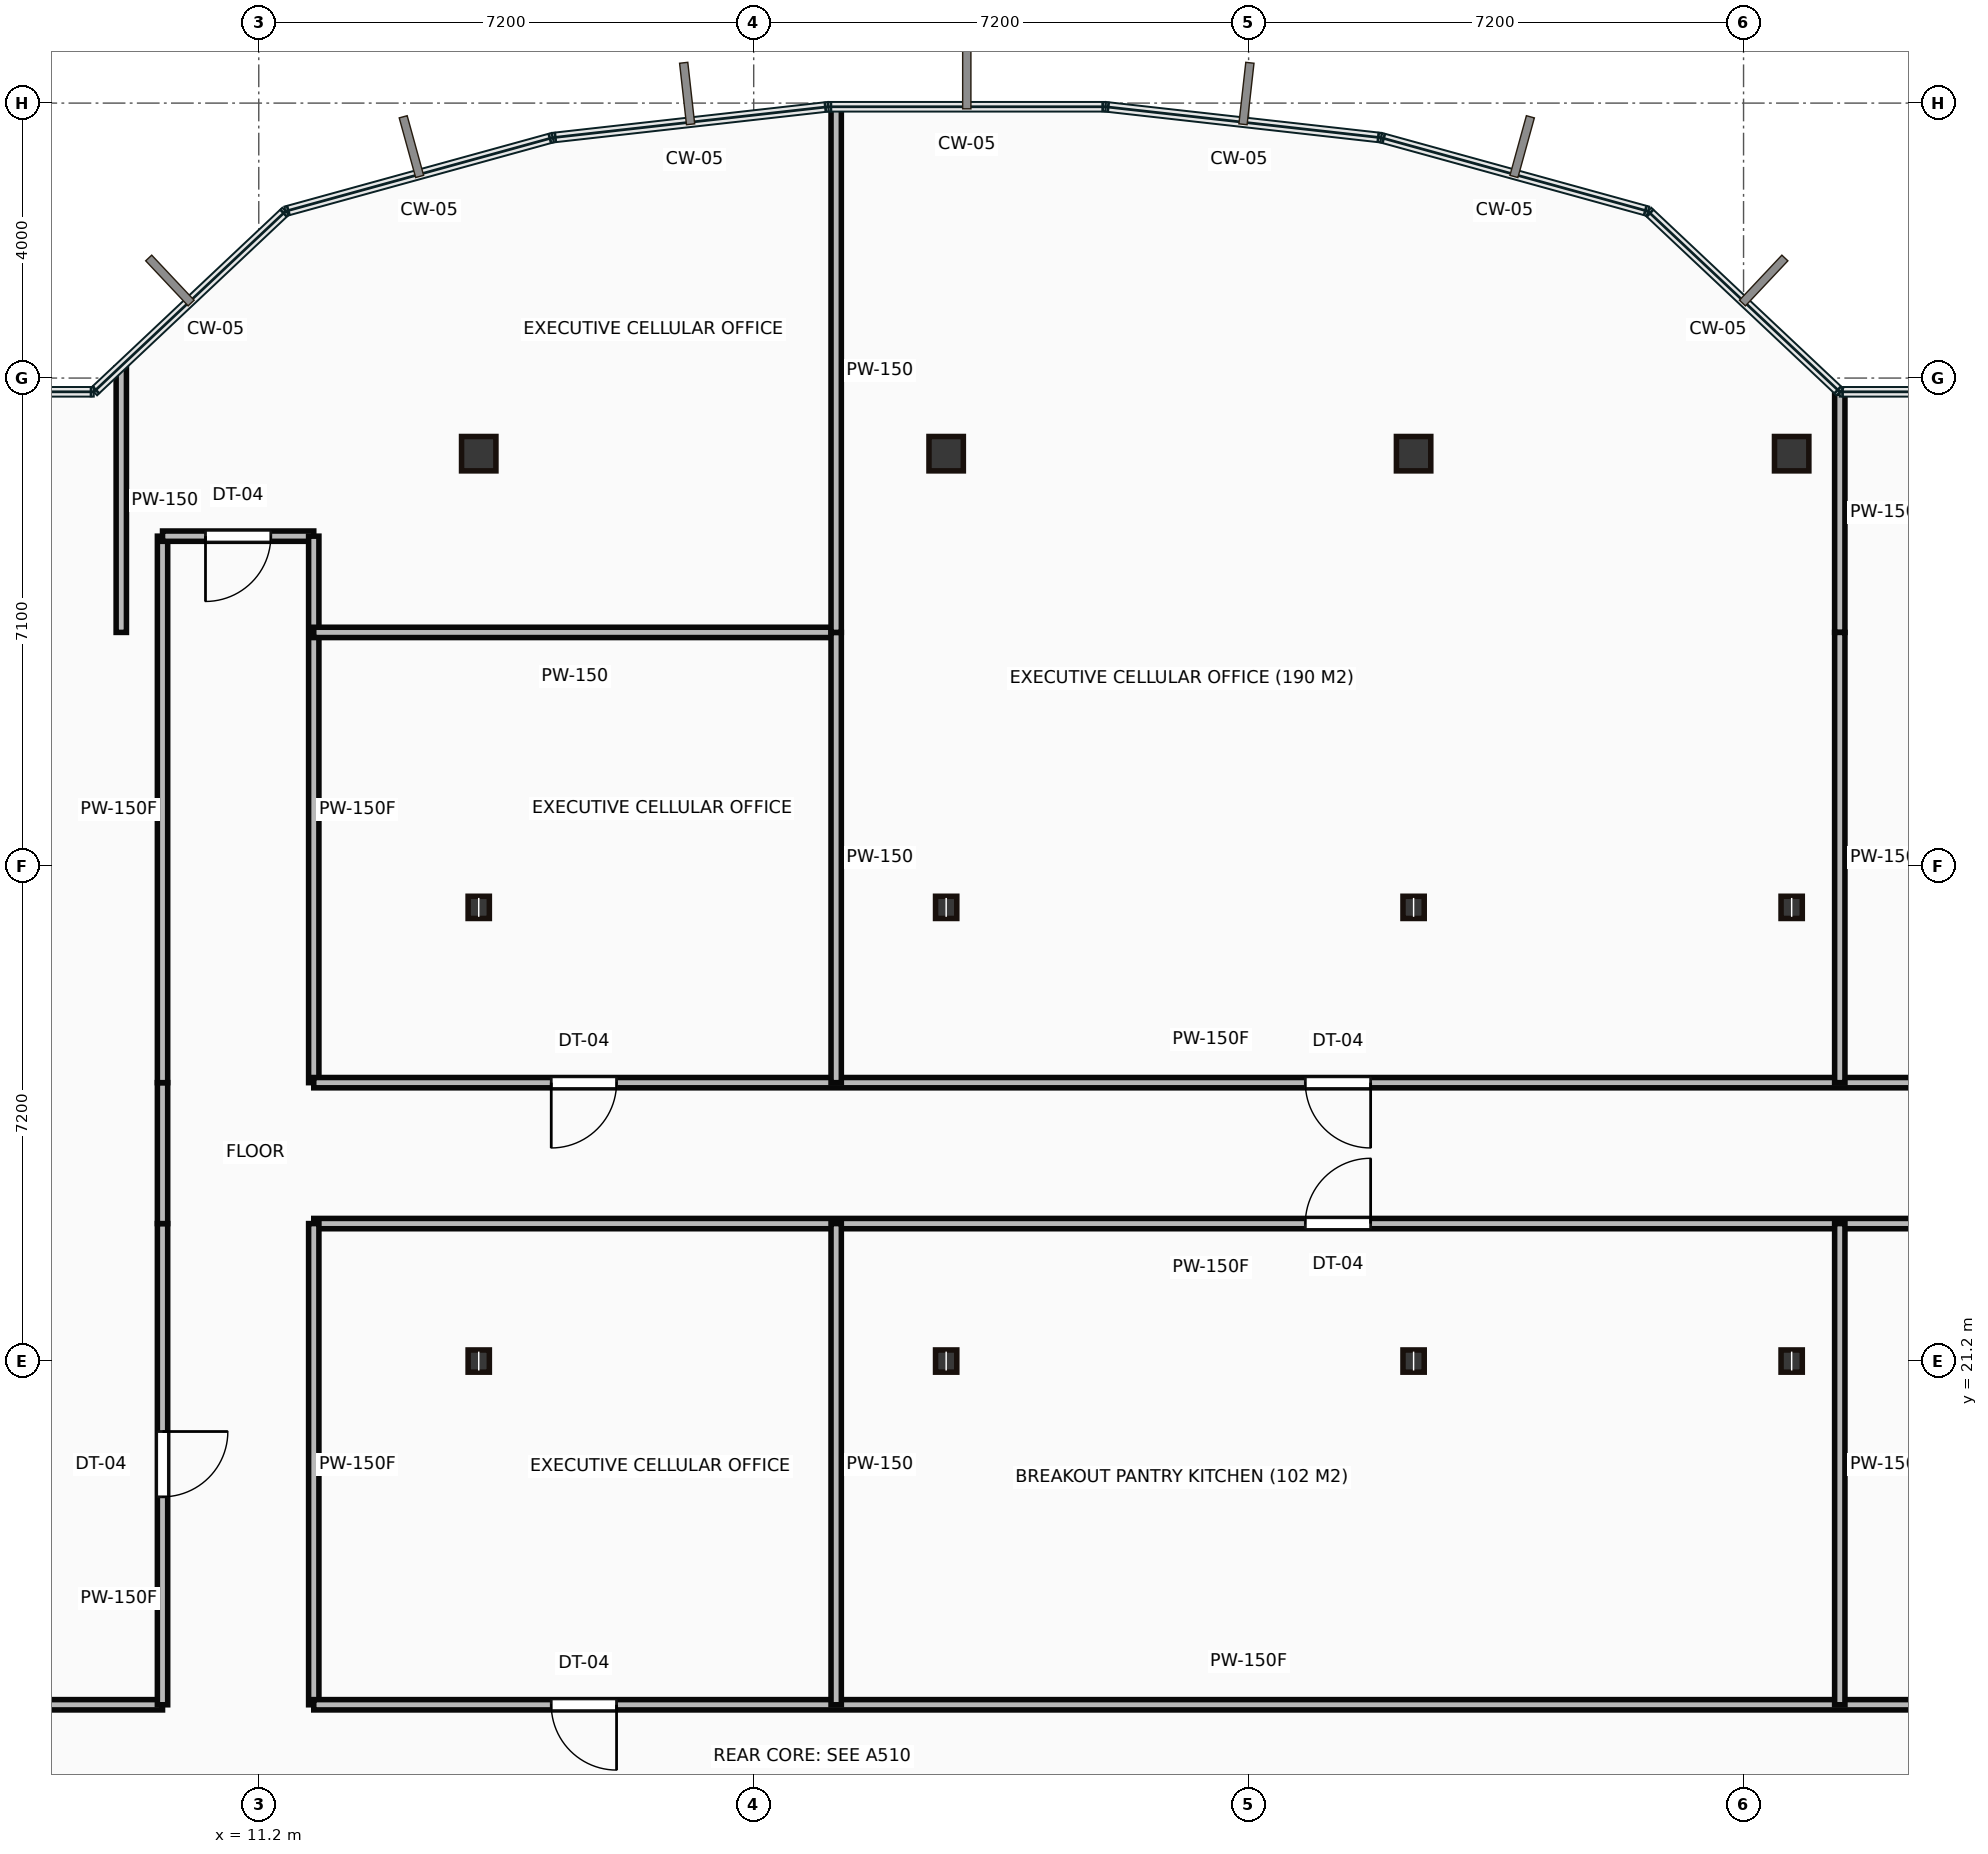
"""IFC4 building model, lengths in metres.
Left out: names, types, materials, properties, quantities, classifications, styles, units other than length and angle.
Written with IfcOpenShell. Run it as: python <this file> out.ifc"""

import sys

from ifc_helpers import new_model, si_unit, direction, frame, frame_2d, origin, origin_2d, place, context, subcontext, project, spatial, rectangle, hollow_rectangle, i_section, extrude, source, transform, mapped, element, fill, save


model = new_model("IFC4")
c1 = context("Model", 3, precision=1e-05, world=origin(), true_north=direction((0.0, 1.0)))
c2 = subcontext(c1, "Body", "Model", "MODEL_VIEW")
j1 = project(units=[si_unit("LENGTHUNIT", "METRE"), si_unit("PLANEANGLEUNIT", "RADIAN")], contexts=[c1])
p1 = place(None, origin())
s1 = spatial("IfcSite", under=j1, at=p1, CompositionType="ELEMENT")
p2 = place(p1, origin())
s2 = spatial("IfcBuilding", under=s1, at=p2, CompositionType="ELEMENT")
p3 = place(p2, frame((0.0, 0.0, 232.4)))
s3 = spatial("IfcBuildingStorey", under=s2, at=p3, CompositionType="ELEMENT", Elevation=232.4)
m1 = source(origin(), c2, "Body", "SweptSolid", [
    extrude(i_section(OverallWidth=0.309, OverallDepth=0.323, WebThickness=0.014, FlangeThickness=0.023, at=origin_2d()), origin(), (0.0, 0.0, 1.0), 3.65),
])
for number, where, z_axis, x_axis in (
    (1, (14.4, 21.2, 0.0), (0.0, 0.0, 1.0), (1.0, 0.0, 0.0)),
    (2, (14.4, 27.8, 0.0), (0.0, 0.0, 1.0), (1.0, 0.0, 0.0)),
):
    element("IfcColumn", number, at=place(p3, frame(where, z_axis=z_axis, x_axis=x_axis)), inside=s3, PredefinedType="COLUMN", context=c2, shape_type="MappedRepresentation", body=[
        mapped(m1, transform((0.0, 0.0, 0.0))),
    ])
m2 = source(origin(), c2, "Body", "SweptSolid", [
    extrude(hollow_rectangle(XDim=0.5, YDim=0.5, WallThickness=0.022, at=origin_2d()), origin(), (0.0, 0.0, 1.0), 3.65),
])
p4 = place(p3, frame((14.4, 34.4, 0.0), z_axis=(0.0, 0.0, 1.0), x_axis=(1.0, 0.0, 0.0)))
e3 = element("IfcColumn", 3, at=p4, inside=s3, PredefinedType="COLUMN", context=c2, shape_type="MappedRepresentation", body=[
    mapped(m2, transform((0.0, 0.0, 0.0))),
])
for number, where, z_axis, x_axis in (
    (4, (21.2, 21.2, 0.0), (0.0, 0.0, 1.0), (1.0, 0.0, 0.0)),
    (5, (21.2, 27.8, 0.0), (0.0, 0.0, 1.0), (1.0, 0.0, 0.0)),
):
    element("IfcColumn", number, at=place(p3, frame(where, z_axis=z_axis, x_axis=x_axis)), inside=s3, PredefinedType="COLUMN", context=c2, shape_type="MappedRepresentation", body=[
        mapped(m1, transform((0.0, 0.0, 0.0))),
    ])
p5 = place(p3, frame((21.2, 34.4, 0.0), z_axis=(0.0, 0.0, 1.0), x_axis=(1.0, 0.0, 0.0)))
e6 = element("IfcColumn", 6, at=p5, inside=s3, PredefinedType="COLUMN", context=c2, shape_type="MappedRepresentation", body=[
    mapped(m2, transform((0.0, 0.0, 0.0))),
])
for number, where, z_axis, x_axis in (
    (7, (28.0, 21.2, 0.0), (0.0, 0.0, 1.0), (1.0, 0.0, 0.0)),
    (8, (28.0, 27.8, 0.0), (0.0, 0.0, 1.0), (1.0, 0.0, 0.0)),
):
    element("IfcColumn", number, at=place(p3, frame(where, z_axis=z_axis, x_axis=x_axis)), inside=s3, PredefinedType="COLUMN", context=c2, shape_type="MappedRepresentation", body=[
        mapped(m1, transform((0.0, 0.0, 0.0))),
    ])
p6 = place(p3, frame((28.0, 34.4, 0.0), z_axis=(0.0, 0.0, 1.0), x_axis=(1.0, 0.0, 0.0)))
e9 = element("IfcColumn", 9, at=p6, inside=s3, PredefinedType="COLUMN", context=c2, shape_type="MappedRepresentation", body=[
    mapped(m2, transform((0.0, 0.0, 0.0))),
])
for number, where, z_axis, x_axis in (
    (10, (33.5, 21.2, 0.0), (0.0, 0.0, 1.0), (1.0, 0.0, 0.0)),
    (11, (33.5, 27.8, 0.0), (0.0, 0.0, 1.0), (1.0, 0.0, 0.0)),
):
    element("IfcColumn", number, at=place(p3, frame(where, z_axis=z_axis, x_axis=x_axis)), inside=s3, PredefinedType="COLUMN", context=c2, shape_type="MappedRepresentation", body=[
        mapped(m1, transform((0.0, 0.0, 0.0))),
    ])
p7 = place(p3, frame((33.5, 34.4, 0.0), z_axis=(0.0, 0.0, 1.0), x_axis=(1.0, 0.0, 0.0)))
e12 = element("IfcColumn", 12, at=p7, inside=s3, PredefinedType="COLUMN", context=c2, shape_type="MappedRepresentation", body=[
    mapped(m2, transform((0.0, 0.0, 0.0))),
])
m3 = source(origin(), c2, "Body", "SweptSolid", [
    extrude(rectangle(XDim=5.2, YDim=0.15, at=frame_2d((2.6, 0.0))), origin(), (0.0, 0.0, 1.0), 3.35),
])
p8 = place(p3, frame((4.6, 16.2, 0.0), z_axis=(0.0, 0.0, 1.0), x_axis=(1.0, 0.0, 0.0)))
e13 = element("IfcWall", 13, at=p8, inside=s3, PredefinedType="PARTITIONING", context=c2, shape_type="MappedRepresentation", body=[
    mapped(m3, transform((0.0, 0.0, 0.0))),
])
m4 = source(origin(), c2, "Body", "SweptSolid", [
    extrude(rectangle(XDim=7.0, YDim=0.15, at=frame_2d((3.5, 0.0))), origin(), (0.0, 0.0, 1.0), 3.35),
])
p9 = place(p3, frame((9.8, 16.2, 0.0), z_axis=(0.0, 0.0, 1.0), x_axis=(0.0, 1.0, 0.0)))
e14 = element("IfcWall", 14, at=p9, inside=s3, PredefinedType="PARTITIONING", context=c2, shape_type="MappedRepresentation", body=[
    mapped(m4, transform((0.0, 0.0, 0.0))),
])
p10 = place(p9, frame((3.025, 0.0, 0.0)))
e15 = element("IfcOpeningElement", 15, at=p10, cuts=e14, PredefinedType="OPENING", context=c2, shape_type="SweptSolid", body=[
    extrude(rectangle(XDim=0.95, YDim=2.15, at=frame_2d((0.475, 1.075))), frame((0.0, 0.085, 0.0), z_axis=(0.0, -1.0, 0.0), x_axis=(1.0, 0.0, 0.0)), (0.0, 0.0, 1.0), 0.17),
])
m5 = source(origin(), c2, "Body", "SweptSolid", [
    extrude(rectangle(XDim=2.05, YDim=0.15, at=frame_2d((1.025, 0.0))), origin(), (0.0, 0.0, 1.0), 3.35),
])
p11 = place(p3, frame((9.8, 23.2, 0.0), z_axis=(0.0, 0.0, 1.0), x_axis=(0.0, 1.0, 0.0)))
e16 = element("IfcWall", 16, at=p11, inside=s3, PredefinedType="PARTITIONING", context=c2, shape_type="MappedRepresentation", body=[
    mapped(m5, transform((0.0, 0.0, 0.0))),
])
m6 = source(origin(), c2, "Body", "SweptSolid", [
    extrude(rectangle(XDim=7.95, YDim=0.15, at=frame_2d((3.975, 0.0))), origin(), (0.0, 0.0, 1.0), 3.35),
])
p12 = place(p3, frame((9.8, 25.25, 0.0), z_axis=(0.0, 0.0, 1.0), x_axis=(0.0, 1.0, 0.0)))
e17 = element("IfcWall", 17, at=p12, inside=s3, PredefinedType="PARTITIONING", context=c2, shape_type="MappedRepresentation", body=[
    mapped(m6, transform((0.0, 0.0, 0.0))),
])
m7 = source(origin(), c2, "Body", "SweptSolid", [
    extrude(rectangle(XDim=2.2, YDim=0.15, at=frame_2d((1.1, 0.0))), origin(), (0.0, 0.0, 1.0), 3.35),
])
p13 = place(p3, frame((9.8, 33.2, 0.0), z_axis=(0.0, 0.0, 1.0), x_axis=(1.0, 0.0, 0.0)))
e18 = element("IfcWall", 18, at=p13, inside=s3, PredefinedType="PARTITIONING", context=c2, shape_type="MappedRepresentation", body=[
    mapped(m7, transform((0.0, 0.0, 0.0))),
])
p14 = place(p13, frame((0.625, 0.0, 0.0)))
e19 = element("IfcOpeningElement", 19, at=p14, cuts=e18, PredefinedType="OPENING", context=c2, shape_type="SweptSolid", body=[
    extrude(rectangle(XDim=0.95, YDim=2.15, at=frame_2d((0.475, 1.075))), frame((0.0, 0.085, 0.0), z_axis=(0.0, -1.0, 0.0), x_axis=(1.0, 0.0, 0.0)), (0.0, 0.0, 1.0), 0.17),
])
p15 = place(p3, frame((12.0, 33.2, 0.0), z_axis=(0.0, 0.0, 1.0), x_axis=(0.0, -1.0, 0.0)))
e20 = element("IfcWall", 20, at=p15, inside=s3, PredefinedType="PARTITIONING", context=c2, shape_type="MappedRepresentation", body=[
    mapped(m6, transform((0.0, 0.0, 0.0))),
])
m8 = source(origin(), c2, "Body", "SweptSolid", [
    extrude(rectangle(XDim=26.1, YDim=0.15, at=frame_2d((13.05, 0.0))), origin(), (0.0, 0.0, 1.0), 3.35),
])
p16 = place(p3, frame((12.0, 25.25, 0.0), z_axis=(0.0, 0.0, 1.0), x_axis=(1.0, 0.0, 0.0)))
e21 = element("IfcWall", 21, at=p16, inside=s3, PredefinedType="PARTITIONING", context=c2, shape_type="MappedRepresentation", body=[
    mapped(m8, transform((0.0, 0.0, 0.0))),
])
p17 = place(p16, frame((3.455, 0.0, 0.0)))
e22 = element("IfcOpeningElement", 22, at=p17, cuts=e21, PredefinedType="OPENING", context=c2, shape_type="SweptSolid", body=[
    extrude(rectangle(XDim=0.95, YDim=2.15, at=frame_2d((0.475, 1.075))), frame((0.0, 0.085, 0.0), z_axis=(0.0, -1.0, 0.0), x_axis=(1.0, 0.0, 0.0)), (0.0, 0.0, 1.0), 0.17),
])
p18 = place(p16, frame((14.425, 0.0, 0.0)))
e23 = element("IfcOpeningElement", 23, at=p18, cuts=e21, PredefinedType="OPENING", context=c2, shape_type="SweptSolid", body=[
    extrude(rectangle(XDim=0.95, YDim=2.15, at=frame_2d((0.475, 1.075))), frame((0.0, 0.085, 0.0), z_axis=(0.0, -1.0, 0.0), x_axis=(1.0, 0.0, 0.0)), (0.0, 0.0, 1.0), 0.17),
])
p19 = place(p16, frame((23.545, 0.0, 0.0)))
e24 = element("IfcOpeningElement", 24, at=p19, cuts=e21, PredefinedType="OPENING", context=c2, shape_type="SweptSolid", body=[
    extrude(rectangle(XDim=0.95, YDim=2.15, at=frame_2d((0.475, 1.075))), frame((0.0, 0.085, 0.0), z_axis=(0.0, -1.0, 0.0), x_axis=(1.0, 0.0, 0.0)), (0.0, 0.0, 1.0), 0.17),
])
p20 = place(p3, frame((38.1, 23.2, 0.0), z_axis=(0.0, 0.0, 1.0), x_axis=(-1.0, 0.0, 0.0)))
e25 = element("IfcWall", 25, at=p20, inside=s3, PredefinedType="PARTITIONING", context=c2, shape_type="MappedRepresentation", body=[
    mapped(m8, transform((0.0, 0.0, 0.0))),
])
p21 = place(p20, frame((10.725, 0.0, 0.0)))
e26 = element("IfcOpeningElement", 26, at=p21, cuts=e25, PredefinedType="OPENING", context=c2, shape_type="SweptSolid", body=[
    extrude(rectangle(XDim=0.95, YDim=2.15, at=frame_2d((0.475, 1.075))), frame((0.0, 0.085, 0.0), z_axis=(0.0, -1.0, 0.0), x_axis=(1.0, 0.0, 0.0)), (0.0, 0.0, 1.0), 0.17),
])
p22 = place(p3, frame((12.0, 23.2, 0.0), z_axis=(0.0, 0.0, 1.0), x_axis=(0.0, -1.0, 0.0)))
e27 = element("IfcWall", 27, at=p22, inside=s3, PredefinedType="PARTITIONING", context=c2, shape_type="MappedRepresentation", body=[
    mapped(m4, transform((0.0, 0.0, 0.0))),
])
m9 = source(origin(), c2, "Body", "SweptSolid", [
    extrude(rectangle(XDim=27.2, YDim=0.15, at=frame_2d((13.6, 0.0))), origin(), (0.0, 0.0, 1.0), 3.35),
])
p23 = place(p3, frame((12.0, 16.2, 0.0), z_axis=(0.0, 0.0, 1.0), x_axis=(1.0, 0.0, 0.0)))
e28 = element("IfcWall", 28, at=p23, inside=s3, PredefinedType="PARTITIONING", context=c2, shape_type="MappedRepresentation", body=[
    mapped(m9, transform((0.0, 0.0, 0.0))),
])
p24 = place(p23, frame((3.455, 0.0, 0.0)))
e29 = element("IfcOpeningElement", 29, at=p24, cuts=e28, PredefinedType="OPENING", context=c2, shape_type="SweptSolid", body=[
    extrude(rectangle(XDim=0.95, YDim=2.15, at=frame_2d((0.475, 1.075))), frame((0.0, 0.085, 0.0), z_axis=(0.0, -1.0, 0.0), x_axis=(1.0, 0.0, 0.0)), (0.0, 0.0, 1.0), 0.17),
])
p25 = place(p23, frame((24.095, 0.0, 0.0)))
e30 = element("IfcOpeningElement", 30, at=p25, cuts=e28, PredefinedType="OPENING", context=c2, shape_type="SweptSolid", body=[
    extrude(rectangle(XDim=0.95, YDim=2.15, at=frame_2d((0.475, 1.075))), frame((0.0, 0.085, 0.0), z_axis=(0.0, -1.0, 0.0), x_axis=(1.0, 0.0, 0.0)), (0.0, 0.0, 1.0), 0.17),
])
m10 = source(origin(), c2, "Body", "SweptSolid", [
    extrude(rectangle(XDim=3.849, YDim=0.15, at=frame_2d((1.925, 0.0))), origin(), (0.0, 0.0, 1.0), 3.35),
])
p26 = place(p3, frame((9.2, 35.649, 0.0), z_axis=(0.0, 0.0, 1.0), x_axis=(0.0, -1.0, 0.0)))
e31 = element("IfcWall", 31, at=p26, inside=s3, PredefinedType="PARTITIONING", context=c2, shape_type="MappedRepresentation", body=[
    mapped(m10, transform((0.0, 0.0, 0.0))),
])
m11 = source(origin(), c2, "Body", "SweptSolid", [
    extrude(rectangle(XDim=7.6, YDim=0.15, at=frame_2d((3.8, 0.0))), origin(), (0.0, 0.0, 1.0), 3.35),
])
p27 = place(p3, frame((19.6, 31.8, 0.0), z_axis=(0.0, 0.0, 1.0), x_axis=(-1.0, 0.0, 0.0)))
e32 = element("IfcWall", 32, at=p27, inside=s3, PredefinedType="PARTITIONING", context=c2, shape_type="MappedRepresentation", body=[
    mapped(m11, transform((0.0, 0.0, 0.0))),
])
p28 = place(p3, frame((19.6, 23.2, 0.0), z_axis=(0.0, 0.0, 1.0), x_axis=(0.0, -1.0, 0.0)))
e33 = element("IfcWall", 33, at=p28, inside=s3, PredefinedType="PARTITIONING", context=c2, shape_type="MappedRepresentation", body=[
    mapped(m4, transform((0.0, 0.0, 0.0))),
])
m12 = source(origin(), c2, "Body", "SweptSolid", [
    extrude(rectangle(XDim=6.55, YDim=0.15, at=frame_2d((3.275, 0.0))), origin(), (0.0, 0.0, 1.0), 3.35),
])
p29 = place(p3, frame((19.6, 31.8, 0.0), z_axis=(0.0, 0.0, 1.0), x_axis=(0.0, -1.0, 0.0)))
e34 = element("IfcWall", 34, at=p29, inside=s3, PredefinedType="PARTITIONING", context=c2, shape_type="MappedRepresentation", body=[
    mapped(m12, transform((0.0, 0.0, 0.0))),
])
m13 = source(origin(), c2, "Body", "SweptSolid", [
    extrude(rectangle(XDim=7.627, YDim=0.15, at=frame_2d((3.813, 0.0))), origin(), (0.0, 0.0, 1.0), 3.35),
])
p30 = place(p3, frame((19.6, 39.427, 0.0), z_axis=(0.0, 0.0, 1.0), x_axis=(0.0, -1.0, 0.0)))
e35 = element("IfcWall", 35, at=p30, inside=s3, PredefinedType="PARTITIONING", context=c2, shape_type="MappedRepresentation", body=[
    mapped(m13, transform((0.0, 0.0, 0.0))),
])
p31 = place(p3, frame((34.2, 23.2, 0.0), z_axis=(0.0, 0.0, 1.0), x_axis=(0.0, -1.0, 0.0)))
e36 = element("IfcWall", 36, at=p31, inside=s3, PredefinedType="PARTITIONING", context=c2, shape_type="MappedRepresentation", body=[
    mapped(m4, transform((0.0, 0.0, 0.0))),
])
m14 = source(origin(), c2, "Body", "SweptSolid", [
    extrude(rectangle(XDim=3.48, YDim=0.15, at=frame_2d((1.74, 0.0))), origin(), (0.0, 0.0, 1.0), 3.35),
])
p32 = place(p3, frame((34.2, 35.28, 0.0), z_axis=(0.0, 0.0, 1.0), x_axis=(0.0, -1.0, 0.0)))
e37 = element("IfcWall", 37, at=p32, inside=s3, PredefinedType="PARTITIONING", context=c2, shape_type="MappedRepresentation", body=[
    mapped(m14, transform((0.0, 0.0, 0.0))),
])
p33 = place(p3, frame((34.2, 31.8, 0.0), z_axis=(0.0, 0.0, 1.0), x_axis=(0.0, -1.0, 0.0)))
e38 = element("IfcWall", 38, at=p33, inside=s3, PredefinedType="PARTITIONING", context=c2, shape_type="MappedRepresentation", body=[
    mapped(m12, transform((0.0, 0.0, 0.0))),
])
m15 = source(origin(), c2, "Body", "SweptSolid", [
    extrude(rectangle(XDim=0.95, YDim=2.15, at=frame_2d((0.475, 1.075))), frame((0.0, 0.025, 0.0), z_axis=(0.0, -1.0, 0.0), x_axis=(1.0, 0.0, 0.0)), (0.0, 0.0, 1.0), 0.05),
])
p34 = place(p10, origin())
e39 = element("IfcDoor", 39, at=p34, inside=s3, OperationType="SINGLE_SWING_RIGHT", PredefinedType="DOOR", context=c2, shape_type="MappedRepresentation", body=[
    mapped(m15, transform((0.0, 0.0, 0.0))),
])
fill(e15, e39)
p35 = place(p14, origin())
e40 = element("IfcDoor", 40, at=p35, inside=s3, OperationType="SINGLE_SWING_LEFT", PredefinedType="DOOR", context=c2, shape_type="MappedRepresentation", body=[
    mapped(m15, transform((0.0, 0.0, 0.0))),
])
fill(e19, e40)
p36 = place(p24, origin())
e41 = element("IfcDoor", 41, at=p36, inside=s3, OperationType="SINGLE_SWING_RIGHT", PredefinedType="DOOR", context=c2, shape_type="MappedRepresentation", body=[
    mapped(m15, transform((0.0, 0.0, 0.0))),
])
fill(e29, e41)
p37 = place(p17, origin())
e42 = element("IfcDoor", 42, at=p37, inside=s3, OperationType="SINGLE_SWING_LEFT", PredefinedType="DOOR", context=c2, shape_type="MappedRepresentation", body=[
    mapped(m15, transform((0.0, 0.0, 0.0))),
])
fill(e22, e42)
p38 = place(p18, origin())
e43 = element("IfcDoor", 43, at=p38, inside=s3, OperationType="SINGLE_SWING_RIGHT", PredefinedType="DOOR", context=c2, shape_type="MappedRepresentation", body=[
    mapped(m15, transform((0.0, 0.0, 0.0))),
])
fill(e23, e43)
p39 = place(p21, origin())
e44 = element("IfcDoor", 44, at=p39, inside=s3, OperationType="SINGLE_SWING_LEFT", PredefinedType="DOOR", context=c2, shape_type="MappedRepresentation", body=[
    mapped(m15, transform((0.0, 0.0, 0.0))),
])
fill(e26, e44)
save(model, sys.argv[1])
